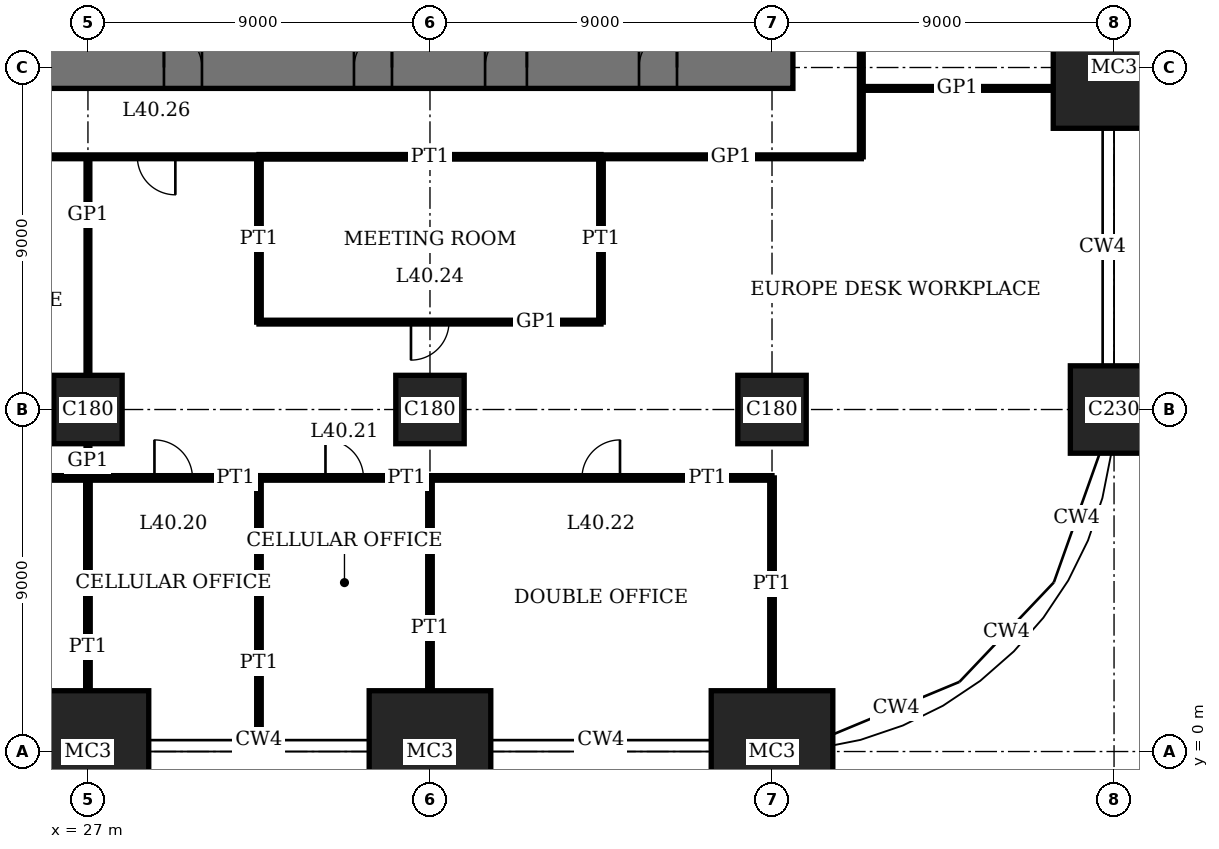
"""IFC4 building model, lengths in metres.
Left out: names, types, materials, properties, quantities, classifications, styles, units other than length and angle.
Written with IfcOpenShell. Run it as: python <this file> out.ifc"""

import sys

from ifc_helpers import new_model, si_unit, direction, frame, frame_2d, origin, origin_2d, place, context, subcontext, project, spatial, rectangle, extrude, element, fill, save


model = new_model("IFC4")
c1 = context("Model", 3, precision=1e-05, world=origin(), true_north=direction((0.0, 1.0)))
c2 = subcontext(c1, "Body", "Model", "MODEL_VIEW")
j1 = project(units=[si_unit("LENGTHUNIT", "METRE"), si_unit("PLANEANGLEUNIT", "RADIAN")], contexts=[c1])
p1 = place(None, origin())
s1 = spatial("IfcSite", under=j1, at=p1, CompositionType="ELEMENT")
p2 = place(p1, origin())
s2 = spatial("IfcBuilding", under=s1, at=p2, CompositionType="ELEMENT")
p3 = place(p2, frame((0.0, 0.0, 166.2)))
s3 = spatial("IfcBuildingStorey", under=s2, at=p3, CompositionType="ELEMENT", Elevation=166.2)
p4 = place(p3, frame((27.0, 0.0, 0.0), z_axis=(0.0, 0.0, 1.0), x_axis=(1.0, 0.0, 0.0)))
e1 = element("IfcColumn", 1, at=p4, inside=s3, PredefinedType="COLUMN", context=c2, shape_type="SweptSolid", body=[
    extrude(rectangle(XDim=3.2, YDim=3.2, at=origin_2d()), origin(), (0.0, 0.0, 1.0), 4.0),
])
p5 = place(p3, frame((27.0, 9.0, 0.0), z_axis=(0.0, 0.0, 1.0), x_axis=(1.0, 0.0, 0.0)))
e2 = element("IfcColumn", 2, at=p5, inside=s3, PredefinedType="COLUMN", context=c2, shape_type="SweptSolid", body=[
    extrude(rectangle(XDim=1.8, YDim=1.8, at=origin_2d()), origin(), (0.0, 0.0, 1.0), 4.0),
])
p6 = place(p3, frame((36.0, 0.0, 0.0), z_axis=(0.0, 0.0, 1.0), x_axis=(1.0, 0.0, 0.0)))
e3 = element("IfcColumn", 3, at=p6, inside=s3, PredefinedType="COLUMN", context=c2, shape_type="SweptSolid", body=[
    extrude(rectangle(XDim=3.2, YDim=3.2, at=origin_2d()), origin(), (0.0, 0.0, 1.0), 4.0),
])
p7 = place(p3, frame((36.0, 9.0, 0.0), z_axis=(0.0, 0.0, 1.0), x_axis=(1.0, 0.0, 0.0)))
e4 = element("IfcColumn", 4, at=p7, inside=s3, PredefinedType="COLUMN", context=c2, shape_type="SweptSolid", body=[
    extrude(rectangle(XDim=1.8, YDim=1.8, at=origin_2d()), origin(), (0.0, 0.0, 1.0), 4.0),
])
p8 = place(p3, frame((45.0, 0.0, 0.0), z_axis=(0.0, 0.0, 1.0), x_axis=(1.0, 0.0, 0.0)))
e5 = element("IfcColumn", 5, at=p8, inside=s3, PredefinedType="COLUMN", context=c2, shape_type="SweptSolid", body=[
    extrude(rectangle(XDim=3.2, YDim=3.2, at=origin_2d()), origin(), (0.0, 0.0, 1.0), 4.0),
])
p9 = place(p3, frame((45.0, 9.0, 0.0), z_axis=(0.0, 0.0, 1.0), x_axis=(1.0, 0.0, 0.0)))
e6 = element("IfcColumn", 6, at=p9, inside=s3, PredefinedType="COLUMN", context=c2, shape_type="SweptSolid", body=[
    extrude(rectangle(XDim=1.8, YDim=1.8, at=origin_2d()), origin(), (0.0, 0.0, 1.0), 4.0),
])
p10 = place(p3, frame((54.0, 9.0, 0.0), z_axis=(0.0, 0.0, 1.0), x_axis=(1.0, 0.0, 0.0)))
e7 = element("IfcColumn", 7, at=p10, inside=s3, PredefinedType="COLUMN", context=c2, shape_type="SweptSolid", body=[
    extrude(rectangle(XDim=2.3, YDim=2.3, at=origin_2d()), origin(), (0.0, 0.0, 1.0), 4.0),
])
p11 = place(p3, frame((54.0, 18.0, 0.0), z_axis=(0.0, 0.0, 1.0), x_axis=(1.0, 0.0, 0.0)))
e8 = element("IfcColumn", 8, at=p11, inside=s3, PredefinedType="COLUMN", context=c2, shape_type="SweptSolid", body=[
    extrude(rectangle(XDim=3.2, YDim=3.2, at=origin_2d()), origin(), (0.0, 0.0, 1.0), 4.0),
])
p12 = place(p3, frame((17.45, 18.0, 0.0), z_axis=(0.0, 0.0, 1.0), x_axis=(1.0, 0.0, 0.0)))
e9 = element("IfcWall", 9, at=p12, inside=s3, PredefinedType="SHEAR", context=c2, shape_type="SweptSolid", body=[
    extrude(rectangle(XDim=28.1, YDim=1.1, at=frame_2d((14.05, 0.0))), origin(), (0.0, 0.0, 1.0), 4.0),
])
p13 = place(p12, frame((11.55, 0.0, 0.0)))
e10 = element("IfcOpeningElement", 10, at=p13, cuts=e9, PredefinedType="OPENING", context=c2, shape_type="SweptSolid", body=[
    extrude(rectangle(XDim=1.0, YDim=2.4, at=frame_2d((0.5, 1.2))), frame((0.0, 0.56, 0.0), z_axis=(0.0, -1.0, 0.0), x_axis=(1.0, 0.0, 0.0)), (0.0, 0.0, 1.0), 1.12),
])
p14 = place(p12, frame((16.55, 0.0, 0.0)))
e11 = element("IfcOpeningElement", 11, at=p14, cuts=e9, PredefinedType="OPENING", context=c2, shape_type="SweptSolid", body=[
    extrude(rectangle(XDim=1.0, YDim=2.4, at=frame_2d((0.5, 1.2))), frame((0.0, 0.56, 0.0), z_axis=(0.0, -1.0, 0.0), x_axis=(1.0, 0.0, 0.0)), (0.0, 0.0, 1.0), 1.12),
])
p15 = place(p12, frame((20.0, 0.0, 0.0)))
e12 = element("IfcOpeningElement", 12, at=p15, cuts=e9, PredefinedType="OPENING", context=c2, shape_type="SweptSolid", body=[
    extrude(rectangle(XDim=1.1, YDim=2.4, at=frame_2d((0.55, 1.2))), frame((0.0, 0.56, 0.0), z_axis=(0.0, -1.0, 0.0), x_axis=(1.0, 0.0, 0.0)), (0.0, 0.0, 1.0), 1.12),
])
p16 = place(p12, frame((24.05, 0.0, 0.0)))
e13 = element("IfcOpeningElement", 13, at=p16, cuts=e9, PredefinedType="OPENING", context=c2, shape_type="SweptSolid", body=[
    extrude(rectangle(XDim=1.0, YDim=2.4, at=frame_2d((0.5, 1.2))), frame((0.0, 0.56, 0.0), z_axis=(0.0, -1.0, 0.0), x_axis=(1.0, 0.0, 0.0)), (0.0, 0.0, 1.0), 1.12),
])
p17 = place(p3, frame((18.0, 7.2, 0.0), z_axis=(0.0, 0.0, 1.0), x_axis=(1.0, 0.0, 0.0)))
e14 = element("IfcWall", 14, at=p17, inside=s3, PredefinedType="PARTITIONING", context=c2, shape_type="SweptSolid", body=[
    extrude(rectangle(XDim=9.0, YDim=0.12, at=frame_2d((4.5, 0.0))), origin(), (0.0, 0.0, 1.0), 3.75),
])
p18 = place(p17, frame((4.0, 0.0, 0.0)))
e15 = element("IfcOpeningElement", 15, at=p18, cuts=e14, PredefinedType="OPENING", context=c2, shape_type="SweptSolid", body=[
    extrude(rectangle(XDim=1.0, YDim=2.4, at=frame_2d((0.5, 1.2))), frame((0.0, 0.07, 0.0), z_axis=(0.0, -1.0, 0.0), x_axis=(1.0, 0.0, 0.0)), (0.0, 0.0, 1.0), 0.14),
])
p19 = place(p3, frame((27.0, 7.2, 0.0), z_axis=(0.0, 0.0, 1.0), x_axis=(1.0, 0.0, 0.0)))
e16 = element("IfcWall", 16, at=p19, inside=s3, PredefinedType="PARTITIONING", context=c2, shape_type="SweptSolid", body=[
    extrude(rectangle(XDim=4.5, YDim=0.12, at=frame_2d((2.25, 0.0))), origin(), (0.0, 0.0, 1.0), 3.75),
])
p20 = place(p19, frame((1.75, 0.0, 0.0)))
e17 = element("IfcOpeningElement", 17, at=p20, cuts=e16, PredefinedType="OPENING", context=c2, shape_type="SweptSolid", body=[
    extrude(rectangle(XDim=1.0, YDim=2.4, at=frame_2d((0.5, 1.2))), frame((0.0, 0.07, 0.0), z_axis=(0.0, -1.0, 0.0), x_axis=(1.0, 0.0, 0.0)), (0.0, 0.0, 1.0), 0.14),
])
p21 = place(p3, frame((31.5, 7.2, 0.0), z_axis=(0.0, 0.0, 1.0), x_axis=(1.0, 0.0, 0.0)))
e18 = element("IfcWall", 18, at=p21, inside=s3, PredefinedType="PARTITIONING", context=c2, shape_type="SweptSolid", body=[
    extrude(rectangle(XDim=4.5, YDim=0.12, at=frame_2d((2.25, 0.0))), origin(), (0.0, 0.0, 1.0), 3.75),
])
p22 = place(p21, frame((1.75, 0.0, 0.0)))
e19 = element("IfcOpeningElement", 19, at=p22, cuts=e18, PredefinedType="OPENING", context=c2, shape_type="SweptSolid", body=[
    extrude(rectangle(XDim=1.0, YDim=2.4, at=frame_2d((0.5, 1.2))), frame((0.0, 0.07, 0.0), z_axis=(0.0, -1.0, 0.0), x_axis=(1.0, 0.0, 0.0)), (0.0, 0.0, 1.0), 0.14),
])
p23 = place(p3, frame((36.0, 7.2, 0.0), z_axis=(0.0, 0.0, 1.0), x_axis=(1.0, 0.0, 0.0)))
e20 = element("IfcWall", 20, at=p23, inside=s3, PredefinedType="PARTITIONING", context=c2, shape_type="SweptSolid", body=[
    extrude(rectangle(XDim=9.0, YDim=0.12, at=frame_2d((4.5, 0.0))), origin(), (0.0, 0.0, 1.0), 3.75),
])
p24 = place(p23, frame((4.0, 0.0, 0.0)))
e21 = element("IfcOpeningElement", 21, at=p24, cuts=e20, PredefinedType="OPENING", context=c2, shape_type="SweptSolid", body=[
    extrude(rectangle(XDim=1.0, YDim=2.4, at=frame_2d((0.5, 1.2))), frame((0.0, 0.07, 0.0), z_axis=(0.0, -1.0, 0.0), x_axis=(1.0, 0.0, 0.0)), (0.0, 0.0, 1.0), 0.14),
])
p25 = place(p3, frame((31.5, 11.3, 0.0), z_axis=(0.0, 0.0, 1.0), x_axis=(1.0, 0.0, 0.0)))
e22 = element("IfcWall", 22, at=p25, inside=s3, PredefinedType="PARTITIONING", context=c2, shape_type="SweptSolid", body=[
    extrude(rectangle(XDim=9.0, YDim=0.1, at=frame_2d((4.5, 0.0))), origin(), (0.0, 0.0, 1.0), 3.75),
])
p26 = place(p25, frame((4.0, 0.0, 0.0)))
e23 = element("IfcOpeningElement", 23, at=p26, cuts=e22, PredefinedType="OPENING", context=c2, shape_type="SweptSolid", body=[
    extrude(rectangle(XDim=1.0, YDim=2.4, at=frame_2d((0.5, 1.2))), frame((0.0, 0.06, 0.0), z_axis=(0.0, -1.0, 0.0), x_axis=(1.0, 0.0, 0.0)), (0.0, 0.0, 1.0), 0.12),
])
p27 = place(p3, frame((31.5, 15.65, 0.0), z_axis=(0.0, 0.0, 1.0), x_axis=(1.0, 0.0, 0.0)))
e24 = element("IfcWall", 24, at=p27, inside=s3, PredefinedType="PARTITIONING", context=c2, shape_type="SweptSolid", body=[
    extrude(rectangle(XDim=9.0, YDim=0.12, at=frame_2d((4.5, 0.0))), origin(), (0.0, 0.0, 1.0), 3.75),
])
p28 = place(p3, frame((18.0, 15.65, 0.0), z_axis=(0.0, 0.0, 1.0), x_axis=(1.0, 0.0, 0.0)))
e25 = element("IfcWall", 25, at=p28, inside=s3, PredefinedType="PARTITIONING", context=c2, shape_type="SweptSolid", body=[
    extrude(rectangle(XDim=13.5, YDim=0.1, at=frame_2d((6.75, 0.0))), origin(), (0.0, 0.0, 1.0), 3.75),
])
p29 = place(p28, frame((6.25, 0.0, 0.0)))
e26 = element("IfcOpeningElement", 26, at=p29, cuts=e25, PredefinedType="OPENING", context=c2, shape_type="SweptSolid", body=[
    extrude(rectangle(XDim=1.0, YDim=2.4, at=frame_2d((0.5, 1.2))), frame((0.0, 0.06, 0.0), z_axis=(0.0, -1.0, 0.0), x_axis=(1.0, 0.0, 0.0)), (0.0, 0.0, 1.0), 0.12),
])
p30 = place(p28, frame((10.3, 0.0, 0.0)))
e27 = element("IfcOpeningElement", 27, at=p30, cuts=e25, PredefinedType="OPENING", context=c2, shape_type="SweptSolid", body=[
    extrude(rectangle(XDim=1.0, YDim=2.4, at=frame_2d((0.5, 1.2))), frame((0.0, 0.06, 0.0), z_axis=(0.0, -1.0, 0.0), x_axis=(1.0, 0.0, 0.0)), (0.0, 0.0, 1.0), 0.12),
])
p31 = place(p3, frame((40.5, 15.65, 0.0), z_axis=(0.0, 0.0, 1.0), x_axis=(1.0, 0.0, 0.0)))
e28 = element("IfcWall", 28, at=p31, inside=s3, PredefinedType="PARTITIONING", context=c2, shape_type="SweptSolid", body=[
    extrude(rectangle(XDim=6.85, YDim=0.1, at=frame_2d((3.425, 0.0))), origin(), (0.0, 0.0, 1.0), 3.75),
])
p32 = place(p3, frame((47.35, 17.45, 0.0), z_axis=(0.0, 0.0, 1.0), x_axis=(1.0, 0.0, 0.0)))
e29 = element("IfcWall", 29, at=p32, inside=s3, PredefinedType="PARTITIONING", context=c2, shape_type="SweptSolid", body=[
    extrude(rectangle(XDim=5.05, YDim=0.1, at=frame_2d((2.525, 0.0))), origin(), (0.0, 0.0, 1.0), 3.05),
])
p33 = place(p3, frame((27.0, 1.6, 0.0), z_axis=(0.0, 0.0, 1.0), x_axis=(0.0, 1.0, 0.0)))
e30 = element("IfcWall", 30, at=p33, inside=s3, PredefinedType="PARTITIONING", context=c2, shape_type="SweptSolid", body=[
    extrude(rectangle(XDim=5.6, YDim=0.12, at=frame_2d((2.8, 0.0))), origin(), (0.0, 0.0, 1.0), 3.05),
])
p34 = place(p3, frame((27.0, 7.2, 0.0), z_axis=(0.0, 0.0, 1.0), x_axis=(0.0, 1.0, 0.0)))
e31 = element("IfcWall", 31, at=p34, inside=s3, PredefinedType="PARTITIONING", context=c2, shape_type="SweptSolid", body=[
    extrude(rectangle(XDim=0.9, YDim=0.1, at=frame_2d((0.45, 0.0))), origin(), (0.0, 0.0, 1.0), 3.05),
])
p35 = place(p3, frame((27.0, 9.9, 0.0), z_axis=(0.0, 0.0, 1.0), x_axis=(0.0, 1.0, 0.0)))
e32 = element("IfcWall", 32, at=p35, inside=s3, PredefinedType="PARTITIONING", context=c2, shape_type="SweptSolid", body=[
    extrude(rectangle(XDim=5.75, YDim=0.1, at=frame_2d((2.875, 0.0))), origin(), (0.0, 0.0, 1.0), 3.05),
])
p36 = place(p3, frame((31.5, 0.31, 0.0), z_axis=(0.0, 0.0, 1.0), x_axis=(0.0, 1.0, 0.0)))
e33 = element("IfcWall", 33, at=p36, inside=s3, PredefinedType="PARTITIONING", context=c2, shape_type="SweptSolid", body=[
    extrude(rectangle(XDim=6.89, YDim=0.12, at=frame_2d((3.445, 0.0))), origin(), (0.0, 0.0, 1.0), 3.75),
])
p37 = place(p3, frame((31.5, 11.3, 0.0), z_axis=(0.0, 0.0, 1.0), x_axis=(0.0, 1.0, 0.0)))
e34 = element("IfcWall", 34, at=p37, inside=s3, PredefinedType="PARTITIONING", context=c2, shape_type="SweptSolid", body=[
    extrude(rectangle(XDim=4.35, YDim=0.12, at=frame_2d((2.175, 0.0))), origin(), (0.0, 0.0, 1.0), 3.75),
])
p38 = place(p3, frame((36.0, 1.6, 0.0), z_axis=(0.0, 0.0, 1.0), x_axis=(0.0, 1.0, 0.0)))
e35 = element("IfcWall", 35, at=p38, inside=s3, PredefinedType="PARTITIONING", context=c2, shape_type="SweptSolid", body=[
    extrude(rectangle(XDim=5.6, YDim=0.12, at=frame_2d((2.8, 0.0))), origin(), (0.0, 0.0, 1.0), 3.05),
])
p39 = place(p3, frame((40.5, 11.3, 0.0), z_axis=(0.0, 0.0, 1.0), x_axis=(0.0, 1.0, 0.0)))
e36 = element("IfcWall", 36, at=p39, inside=s3, PredefinedType="PARTITIONING", context=c2, shape_type="SweptSolid", body=[
    extrude(rectangle(XDim=4.35, YDim=0.12, at=frame_2d((2.175, 0.0))), origin(), (0.0, 0.0, 1.0), 3.75),
])
p40 = place(p3, frame((45.0, 1.6, 0.0), z_axis=(0.0, 0.0, 1.0), x_axis=(0.0, 1.0, 0.0)))
e37 = element("IfcWall", 37, at=p40, inside=s3, PredefinedType="PARTITIONING", context=c2, shape_type="SweptSolid", body=[
    extrude(rectangle(XDim=5.6, YDim=0.12, at=frame_2d((2.8, 0.0))), origin(), (0.0, 0.0, 1.0), 3.05),
])
p41 = place(p3, frame((47.35, 15.65, 0.0), z_axis=(0.0, 0.0, 1.0), x_axis=(0.0, 1.0, 0.0)))
e38 = element("IfcWall", 38, at=p41, inside=s3, PredefinedType="PARTITIONING", context=c2, shape_type="SweptSolid", body=[
    extrude(rectangle(XDim=22.7, YDim=0.1, at=frame_2d((11.35, 0.0))), origin(), (0.0, 0.0, 1.0), 3.75),
])
p42 = place(p41, frame((10.85, 0.0, 0.0)))
e39 = element("IfcOpeningElement", 39, at=p42, cuts=e38, PredefinedType="OPENING", context=c2, shape_type="SweptSolid", body=[
    extrude(rectangle(XDim=1.0, YDim=2.4, at=frame_2d((0.5, 1.2))), frame((0.0, 0.06, 0.0), z_axis=(0.0, -1.0, 0.0), x_axis=(1.0, 0.0, 0.0)), (0.0, 0.0, 1.0), 0.12),
])
p43 = place(p13, origin())
e40 = element("IfcDoor", 40, at=p43, inside=s3, OperationType="SINGLE_SWING_RIGHT", PredefinedType="DOOR", context=c2, shape_type="SweptSolid", body=[
    extrude(rectangle(XDim=1.0, YDim=2.4, at=frame_2d((0.5, 1.2))), frame((0.0, 0.025, 0.0), z_axis=(0.0, -1.0, 0.0), x_axis=(1.0, 0.0, 0.0)), (0.0, 0.0, 1.0), 0.05),
    extrude(rectangle(XDim=0.04, YDim=2.4, at=frame_2d((0.02, 1.2))), frame((0.0, 0.4, 0.0), z_axis=(0.0, -1.0, 0.0), x_axis=(1.0, 0.0, 0.0)), (0.0, 0.0, 1.0), 0.8),
    extrude(rectangle(XDim=0.04, YDim=2.4, at=frame_2d((0.98, 1.2))), frame((0.0, 0.4, 0.0), z_axis=(0.0, -1.0, 0.0), x_axis=(1.0, 0.0, 0.0)), (0.0, 0.0, 1.0), 0.8),
    extrude(rectangle(XDim=1.0, YDim=0.04, at=frame_2d((0.5, 2.38))), frame((0.0, 0.4, 0.0), z_axis=(0.0, -1.0, 0.0), x_axis=(1.0, 0.0, 0.0)), (0.0, 0.0, 1.0), 0.8),
])
fill(e10, e40)
p44 = place(p14, origin())
e41 = element("IfcDoor", 41, at=p44, inside=s3, OperationType="SINGLE_SWING_LEFT", PredefinedType="DOOR", context=c2, shape_type="SweptSolid", body=[
    extrude(rectangle(XDim=1.0, YDim=2.4, at=frame_2d((0.5, 1.2))), frame((0.0, 0.025, 0.0), z_axis=(0.0, -1.0, 0.0), x_axis=(1.0, 0.0, 0.0)), (0.0, 0.0, 1.0), 0.05),
    extrude(rectangle(XDim=0.04, YDim=2.4, at=frame_2d((0.02, 1.2))), frame((0.0, 0.4, 0.0), z_axis=(0.0, -1.0, 0.0), x_axis=(1.0, 0.0, 0.0)), (0.0, 0.0, 1.0), 0.8),
    extrude(rectangle(XDim=0.04, YDim=2.4, at=frame_2d((0.98, 1.2))), frame((0.0, 0.4, 0.0), z_axis=(0.0, -1.0, 0.0), x_axis=(1.0, 0.0, 0.0)), (0.0, 0.0, 1.0), 0.8),
    extrude(rectangle(XDim=1.0, YDim=0.04, at=frame_2d((0.5, 2.38))), frame((0.0, 0.4, 0.0), z_axis=(0.0, -1.0, 0.0), x_axis=(1.0, 0.0, 0.0)), (0.0, 0.0, 1.0), 0.8),
])
fill(e11, e41)
p45 = place(p15, origin())
e42 = element("IfcDoor", 42, at=p45, inside=s3, OperationType="SINGLE_SWING_LEFT", PredefinedType="DOOR", context=c2, shape_type="SweptSolid", body=[
    extrude(rectangle(XDim=1.1, YDim=2.4, at=frame_2d((0.55, 1.2))), frame((0.0, 0.025, 0.0), z_axis=(0.0, -1.0, 0.0), x_axis=(1.0, 0.0, 0.0)), (0.0, 0.0, 1.0), 0.05),
    extrude(rectangle(XDim=0.04, YDim=2.4, at=frame_2d((0.02, 1.2))), frame((0.0, 0.44, 0.0), z_axis=(0.0, -1.0, 0.0), x_axis=(1.0, 0.0, 0.0)), (0.0, 0.0, 1.0), 0.88),
    extrude(rectangle(XDim=0.04, YDim=2.4, at=frame_2d((1.08, 1.2))), frame((0.0, 0.44, 0.0), z_axis=(0.0, -1.0, 0.0), x_axis=(1.0, 0.0, 0.0)), (0.0, 0.0, 1.0), 0.88),
    extrude(rectangle(XDim=1.1, YDim=0.04, at=frame_2d((0.55, 2.38))), frame((0.0, 0.44, 0.0), z_axis=(0.0, -1.0, 0.0), x_axis=(1.0, 0.0, 0.0)), (0.0, 0.0, 1.0), 0.88),
])
fill(e12, e42)
p46 = place(p16, origin())
e43 = element("IfcDoor", 43, at=p46, inside=s3, OperationType="SINGLE_SWING_LEFT", PredefinedType="DOOR", context=c2, shape_type="SweptSolid", body=[
    extrude(rectangle(XDim=1.0, YDim=2.4, at=frame_2d((0.5, 1.2))), frame((0.0, 0.025, 0.0), z_axis=(0.0, -1.0, 0.0), x_axis=(1.0, 0.0, 0.0)), (0.0, 0.0, 1.0), 0.05),
    extrude(rectangle(XDim=0.04, YDim=2.4, at=frame_2d((0.02, 1.2))), frame((0.0, 0.4, 0.0), z_axis=(0.0, -1.0, 0.0), x_axis=(1.0, 0.0, 0.0)), (0.0, 0.0, 1.0), 0.8),
    extrude(rectangle(XDim=0.04, YDim=2.4, at=frame_2d((0.98, 1.2))), frame((0.0, 0.4, 0.0), z_axis=(0.0, -1.0, 0.0), x_axis=(1.0, 0.0, 0.0)), (0.0, 0.0, 1.0), 0.8),
    extrude(rectangle(XDim=1.0, YDim=0.04, at=frame_2d((0.5, 2.38))), frame((0.0, 0.4, 0.0), z_axis=(0.0, -1.0, 0.0), x_axis=(1.0, 0.0, 0.0)), (0.0, 0.0, 1.0), 0.8),
])
fill(e13, e43)
p47 = place(p20, origin())
e44 = element("IfcDoor", 44, at=p47, inside=s3, OperationType="SINGLE_SWING_RIGHT", PredefinedType="DOOR", context=c2, shape_type="SweptSolid", body=[
    extrude(rectangle(XDim=1.0, YDim=2.4, at=frame_2d((0.5, 1.2))), frame((0.0, 0.025, 0.0), z_axis=(0.0, -1.0, 0.0), x_axis=(1.0, 0.0, 0.0)), (0.0, 0.0, 1.0), 0.05),
])
fill(e17, e44)
p48 = place(p22, origin())
e45 = element("IfcDoor", 45, at=p48, inside=s3, OperationType="SINGLE_SWING_RIGHT", PredefinedType="DOOR", context=c2, shape_type="SweptSolid", body=[
    extrude(rectangle(XDim=1.0, YDim=2.4, at=frame_2d((0.5, 1.2))), frame((0.0, 0.025, 0.0), z_axis=(0.0, -1.0, 0.0), x_axis=(1.0, 0.0, 0.0)), (0.0, 0.0, 1.0), 0.05),
])
fill(e19, e45)
p49 = place(p24, origin())
e46 = element("IfcDoor", 46, at=p49, inside=s3, OperationType="SINGLE_SWING_LEFT", PredefinedType="DOOR", context=c2, shape_type="SweptSolid", body=[
    extrude(rectangle(XDim=1.0, YDim=2.4, at=frame_2d((0.5, 1.2))), frame((0.0, 0.025, 0.0), z_axis=(0.0, -1.0, 0.0), x_axis=(1.0, 0.0, 0.0)), (0.0, 0.0, 1.0), 0.05),
])
fill(e21, e46)
p50 = place(p26, origin())
e47 = element("IfcDoor", 47, at=p50, inside=s3, OperationType="SINGLE_SWING_LEFT", PredefinedType="DOOR", context=c2, shape_type="SweptSolid", body=[
    extrude(rectangle(XDim=1.0, YDim=2.4, at=frame_2d((0.5, 1.2))), frame((0.0, 0.02, 0.0), z_axis=(0.0, -1.0, 0.0), x_axis=(1.0, 0.0, 0.0)), (0.0, 0.0, 1.0), 0.04),
])
fill(e23, e47)
p51 = place(p30, origin())
e48 = element("IfcDoor", 48, at=p51, inside=s3, OperationType="SINGLE_SWING_RIGHT", PredefinedType="DOOR", context=c2, shape_type="SweptSolid", body=[
    extrude(rectangle(XDim=1.0, YDim=2.4, at=frame_2d((0.5, 1.2))), frame((0.0, 0.02, 0.0), z_axis=(0.0, -1.0, 0.0), x_axis=(1.0, 0.0, 0.0)), (0.0, 0.0, 1.0), 0.04),
])
fill(e27, e48)
save(model, sys.argv[1])
